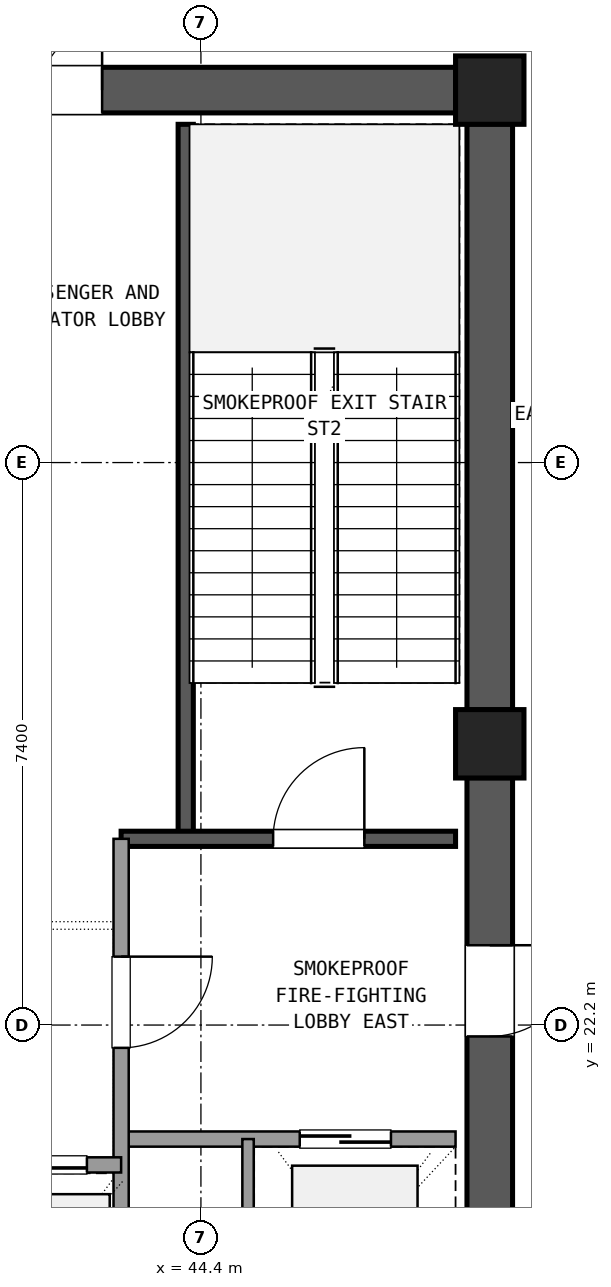
"""IFC4 building model, lengths in metres.
Left out: names, types, materials, properties, quantities, classifications, styles, units other than length and angle.
Written with IfcOpenShell. Run it as: python <this file> out.ifc"""

import sys

from ifc_helpers import new_model, si_unit, direction, frame, frame_2d, origin, origin_2d, place, context, subcontext, project, spatial, rectangle, extrude, element, fill, save


model = new_model("IFC4")
c1 = context("Model", 3, precision=1e-05, world=origin(), true_north=direction((0.0, 1.0)))
c2 = subcontext(c1, "Body", "Model", "MODEL_VIEW")
j1 = project(units=[si_unit("LENGTHUNIT", "METRE"), si_unit("PLANEANGLEUNIT", "RADIAN")], contexts=[c1])
p1 = place(None, origin())
s1 = spatial("IfcSite", under=j1, at=p1, CompositionType="ELEMENT")
p2 = place(p1, origin())
s2 = spatial("IfcBuilding", under=s1, at=p2, CompositionType="ELEMENT")
p3 = place(p2, frame((0.0, 0.0, 182.7)))
s3 = spatial("IfcBuildingStorey", under=s2, at=p3, CompositionType="ELEMENT", Elevation=182.7)
for number, where, z_axis, x_axis in (
    (1, (48.2, 25.9, 0.0), (0.0, 0.0, 1.0), (1.0, 0.0, 0.0)),
    (2, (48.2, 34.5, 0.0), (0.0, 0.0, 1.0), (1.0, 0.0, 0.0)),
):
    element("IfcColumn", number, at=place(p3, frame(where, z_axis=z_axis, x_axis=x_axis)), inside=s3, PredefinedType="COLUMN", context=c2, shape_type="SweptSolid", body=[
        extrude(rectangle(XDim=0.9, YDim=0.9, at=origin_2d()), origin(), (0.0, 0.0, 1.0), 5.76),
    ])
p4 = place(p3, frame((48.2, 17.745, 0.0), z_axis=(0.0, 0.0, 1.0), x_axis=(0.0, 1.0, 0.0)))
e3 = element("IfcWall", 3, at=p4, inside=s3, PredefinedType="SHEAR", context=c2, shape_type="SweptSolid", body=[
    extrude(rectangle(XDim=7.71, YDim=0.6, at=frame_2d((3.855, 0.0))), origin(), (0.0, 0.0, 1.0), 5.46),
])
p5 = place(p4, frame((4.305, 0.0, 0.0)))
e4 = element("IfcOpeningElement", 4, at=p5, cuts=e3, PredefinedType="OPENING", context=c2, shape_type="SweptSolid", body=[
    extrude(rectangle(XDim=1.2, YDim=2.15, at=frame_2d((0.6, 1.075))), frame((0.0, 0.31, 0.0), z_axis=(0.0, -1.0, 0.0), x_axis=(1.0, 0.0, 0.0)), (0.0, 0.0, 1.0), 0.62),
])
p6 = place(p3, frame((48.2, 26.345, 0.0), z_axis=(0.0, 0.0, 1.0), x_axis=(0.0, 1.0, 0.0)))
e5 = element("IfcWall", 5, at=p6, inside=s3, PredefinedType="SHEAR", context=c2, shape_type="SweptSolid", body=[
    extrude(rectangle(XDim=7.71, YDim=0.6, at=frame_2d((3.855, 0.0))), origin(), (0.0, 0.0, 1.0), 5.46),
])
p7 = place(p3, frame((47.755, 34.5, 0.0), z_axis=(0.0, 0.0, 1.0), x_axis=(-1.0, 0.0, 0.0)))
e6 = element("IfcWall", 6, at=p7, inside=s3, PredefinedType="SHEAR", context=c2, shape_type="SweptSolid", body=[
    extrude(rectangle(XDim=10.31, YDim=0.6, at=frame_2d((5.155, 0.0))), origin(), (0.0, 0.0, 1.0), 5.46),
])
p8 = place(p7, frame((4.655, 0.0, 0.0)))
e7 = element("IfcOpeningElement", 7, at=p8, cuts=e6, PredefinedType="OPENING", context=c2, shape_type="SweptSolid", body=[
    extrude(rectangle(XDim=1.6, YDim=2.2, at=frame_2d((0.8, 1.1))), frame((0.0, 0.31, 0.0), z_axis=(0.0, -1.0, 0.0), x_axis=(1.0, 0.0, 0.0)), (0.0, 0.0, 1.0), 0.62),
])
p9 = place(p3, frame((44.2, 24.65, 0.0), z_axis=(0.0, 0.0, 1.0), x_axis=(0.0, 1.0, 0.0)))
e8 = element("IfcWall", 8, at=p9, inside=s3, PredefinedType="SHEAR", context=c2, shape_type="SweptSolid", body=[
    extrude(rectangle(XDim=9.4, YDim=0.2, at=frame_2d((4.7, 0.0))), origin(), (0.0, 0.0, 1.0), 5.46),
])
p10 = place(p3, frame((43.35, 24.65, 0.0), z_axis=(0.0, 0.0, 1.0), x_axis=(1.0, 0.0, 0.0)))
e9 = element("IfcWall", 9, at=p10, inside=s3, PredefinedType="SHEAR", context=c2, shape_type="SweptSolid", body=[
    extrude(rectangle(XDim=4.4, YDim=0.2, at=frame_2d((2.2, 0.0))), origin(), (0.0, 0.0, 1.0), 5.46),
])
p11 = place(p10, frame((2.0, 0.0, 0.0)))
e10 = element("IfcOpeningElement", 10, at=p11, cuts=e9, PredefinedType="OPENING", context=c2, shape_type="SweptSolid", body=[
    extrude(rectangle(XDim=1.2, YDim=2.15, at=frame_2d((0.6, 1.075))), frame((0.0, 0.11, 0.0), z_axis=(0.0, -1.0, 0.0), x_axis=(1.0, 0.0, 0.0)), (0.0, 0.0, 1.0), 0.22),
])
p12 = place(p3, frame((43.35, 20.7, 0.0), z_axis=(0.0, 0.0, 1.0), x_axis=(1.0, 0.0, 0.0)))
e11 = element("IfcWall", 11, at=p12, inside=s3, PredefinedType="SOLIDWALL", context=c2, shape_type="SweptSolid", body=[
    extrude(rectangle(XDim=4.4, YDim=0.2, at=frame_2d((2.2, 0.0))), origin(), (0.0, 0.0, 1.0), 4.37),
])
p13 = place(p12, frame((2.35, 0.0, 0.0)))
e12 = element("IfcOpeningElement", 12, at=p13, cuts=e11, PredefinedType="OPENING", context=c2, shape_type="SweptSolid", body=[
    extrude(rectangle(XDim=1.2, YDim=2.15, at=frame_2d((0.6, 1.075))), frame((0.0, 0.11, 0.0), z_axis=(0.0, -1.0, 0.0), x_axis=(1.0, 0.0, 0.0)), (0.0, 0.0, 1.0), 0.22),
])
p14 = place(p3, frame((43.35, 17.75, 0.0), z_axis=(0.0, 0.0, 1.0), x_axis=(0.0, 1.0, 0.0)))
e13 = element("IfcWall", 13, at=p14, inside=s3, PredefinedType="SOLIDWALL", context=c2, shape_type="SweptSolid", body=[
    extrude(rectangle(XDim=6.9, YDim=0.2, at=frame_2d((3.45, 0.0))), origin(), (0.0, 0.0, 1.0), 4.37),
])
p15 = place(p14, frame((4.15, 0.0, 0.0)))
e14 = element("IfcOpeningElement", 14, at=p15, cuts=e13, PredefinedType="OPENING", context=c2, shape_type="SweptSolid", body=[
    extrude(rectangle(XDim=1.2, YDim=2.15, at=frame_2d((0.6, 1.075))), frame((0.0, 0.11, 0.0), z_axis=(0.0, -1.0, 0.0), x_axis=(1.0, 0.0, 0.0)), (0.0, 0.0, 1.0), 0.22),
])
p16 = place(p3, frame((45.02, 17.75, 0.0), z_axis=(0.0, 0.0, 1.0), x_axis=(0.0, 1.0, 0.0)))
e15 = element("IfcWall", 15, at=p16, inside=s3, PredefinedType="PARTITIONING", context=c2, shape_type="SweptSolid", body=[
    extrude(rectangle(XDim=2.95, YDim=0.15, at=frame_2d((1.475, 0.0))), origin(), (0.0, 0.0, 1.0), 4.37),
])
p17 = place(p3, frame((37.25, 20.36, 0.0), z_axis=(0.0, 0.0, 1.0), x_axis=(1.0, 0.0, 0.0)))
e16 = element("IfcWall", 16, at=p17, inside=s3, PredefinedType="SOLIDWALL", context=c2, shape_type="SweptSolid", body=[
    extrude(rectangle(XDim=6.1, YDim=0.2, at=frame_2d((3.05, 0.0))), origin(), (0.0, 0.0, 1.0), 4.37),
])
p18 = place(p17, frame((0.45, 0.0, 0.0)))
e17 = element("IfcOpeningElement", 17, at=p18, cuts=e16, PredefinedType="OPENING", context=c2, shape_type="SweptSolid", body=[
    extrude(rectangle(XDim=1.1, YDim=2.15, at=frame_2d((0.55, 1.075))), frame((0.0, 0.11, 0.0), z_axis=(0.0, -1.0, 0.0), x_axis=(1.0, 0.0, 0.0)), (0.0, 0.0, 1.0), 0.22),
])
p19 = place(p17, frame((2.5, 0.0, 0.0)))
e18 = element("IfcOpeningElement", 18, at=p19, cuts=e16, PredefinedType="OPENING", context=c2, shape_type="SweptSolid", body=[
    extrude(rectangle(XDim=1.1, YDim=2.15, at=frame_2d((0.55, 1.075))), frame((0.0, 0.11, 0.0), z_axis=(0.0, -1.0, 0.0), x_axis=(1.0, 0.0, 0.0)), (0.0, 0.0, 1.0), 0.22),
])
p20 = place(p17, frame((4.55, 0.0, 0.0)))
e19 = element("IfcOpeningElement", 19, at=p20, cuts=e16, PredefinedType="OPENING", context=c2, shape_type="SweptSolid", body=[
    extrude(rectangle(XDim=1.1, YDim=2.15, at=frame_2d((0.55, 1.075))), frame((0.0, 0.11, 0.0), z_axis=(0.0, -1.0, 0.0), x_axis=(1.0, 0.0, 0.0)), (0.0, 0.0, 1.0), 0.22),
])
p21 = place(p11, origin())
e20 = element("IfcDoor", 20, at=p21, inside=s3, OperationType="SINGLE_SWING_RIGHT", PredefinedType="DOOR", context=c2, shape_type="SweptSolid", body=[
    extrude(rectangle(XDim=1.2, YDim=2.15, at=frame_2d((0.6, 1.075))), frame((0.0, 0.025, 0.0), z_axis=(0.0, -1.0, 0.0), x_axis=(1.0, 0.0, 0.0)), (0.0, 0.0, 1.0), 0.05),
])
fill(e10, e20)
p22 = place(p13, origin())
e21 = element("IfcDoor", 21, at=p22, inside=s3, OperationType="SLIDING_TO_RIGHT", PredefinedType="DOOR", context=c2, shape_type="SweptSolid", body=[
    extrude(rectangle(XDim=1.2, YDim=2.15, at=frame_2d((0.6, 1.075))), frame((0.0, 0.025, 0.0), z_axis=(0.0, -1.0, 0.0), x_axis=(1.0, 0.0, 0.0)), (0.0, 0.0, 1.0), 0.05),
])
fill(e12, e21)
p23 = place(p15, frame((1.2, 0.0, 0.0), z_axis=(0.0, 0.0, 1.0), x_axis=(-1.0, 0.0, 0.0)))
e22 = element("IfcDoor", 22, at=p23, inside=s3, OperationType="SINGLE_SWING_RIGHT", PredefinedType="DOOR", context=c2, shape_type="SweptSolid", body=[
    extrude(rectangle(XDim=1.2, YDim=2.15, at=frame_2d((0.6, 1.075))), frame((0.0, 0.025, 0.0), z_axis=(0.0, -1.0, 0.0), x_axis=(1.0, 0.0, 0.0)), (0.0, 0.0, 1.0), 0.05),
])
fill(e14, e22)
p24 = place(p5, frame((1.2, 0.0, 0.0), z_axis=(0.0, 0.0, 1.0), x_axis=(-1.0, 0.0, 0.0)))
e23 = element("IfcDoor", 23, at=p24, inside=s3, OperationType="SINGLE_SWING_RIGHT", PredefinedType="DOOR", context=c2, shape_type="SweptSolid", body=[
    extrude(rectangle(XDim=1.2, YDim=2.15, at=frame_2d((0.6, 1.075))), frame((0.0, 0.025, 0.0), z_axis=(0.0, -1.0, 0.0), x_axis=(1.0, 0.0, 0.0)), (0.0, 0.0, 1.0), 0.05),
])
fill(e4, e23)
p25 = place(p8, frame((1.6, 0.0, 0.0), z_axis=(0.0, 0.0, 1.0), x_axis=(-1.0, 0.0, 0.0)))
e24 = element("IfcDoor", 24, at=p25, inside=s3, OperationType="DOUBLE_DOOR_SINGLE_SWING", PredefinedType="DOOR", context=c2, shape_type="SweptSolid", body=[
    extrude(rectangle(XDim=1.6, YDim=2.2, at=frame_2d((0.8, 1.1))), frame((0.0, 0.025, 0.0), z_axis=(0.0, -1.0, 0.0), x_axis=(1.0, 0.0, 0.0)), (0.0, 0.0, 1.0), 0.05),
])
fill(e7, e24)
p26 = place(p20, origin())
e25 = element("IfcDoor", 25, at=p26, inside=s3, OperationType="SLIDING_TO_LEFT", PredefinedType="DOOR", context=c2, shape_type="SweptSolid", body=[
    extrude(rectangle(XDim=1.1, YDim=2.15, at=frame_2d((0.55, 1.075))), frame((0.0, 0.025, 0.0), z_axis=(0.0, -1.0, 0.0), x_axis=(1.0, 0.0, 0.0)), (0.0, 0.0, 1.0), 0.05),
])
fill(e19, e25)
save(model, sys.argv[1])
